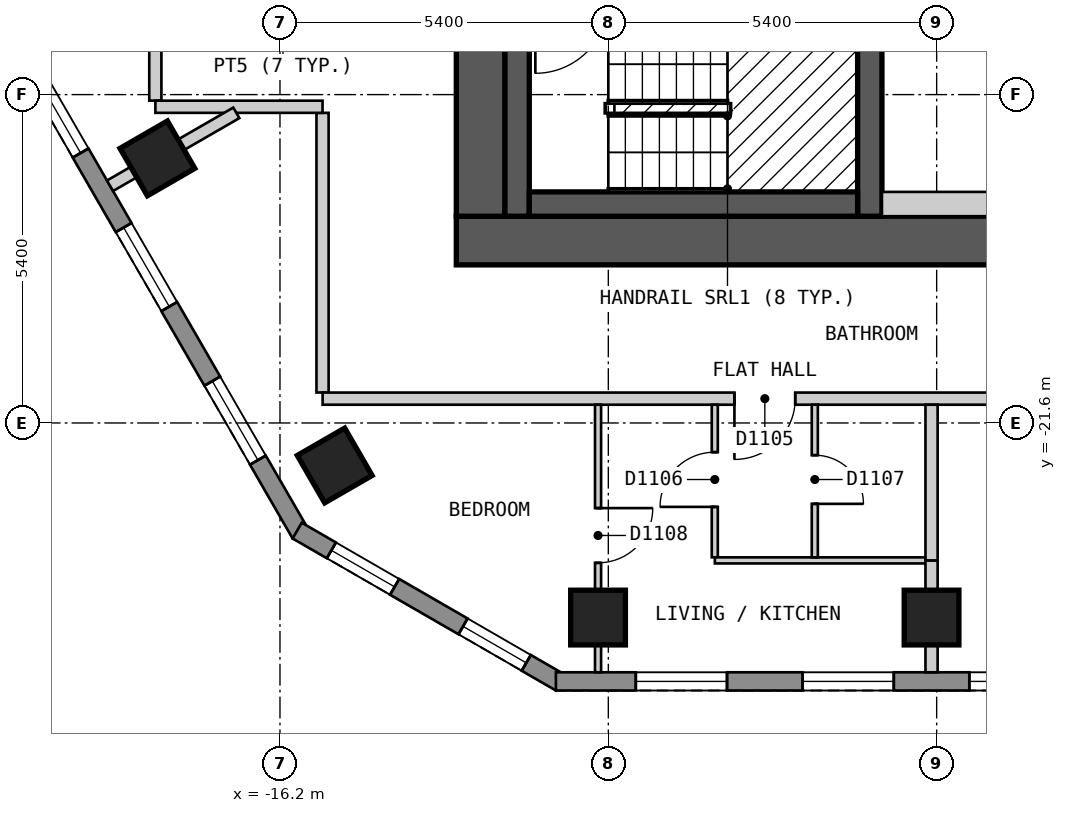
"""IFC4 building model, lengths in metres.
Left out: names, types, materials, properties, quantities, classifications, styles, units other than length and angle.
Written with IfcOpenShell. Run it as: python <this file> out.ifc"""

import sys

from ifc_helpers import new_model, si_unit, direction, frame, frame_2d, origin, origin_2d, place, context, subcontext, project, spatial, polyline, rectangle, outline, extrude, element, fill, save


model = new_model("IFC4")
c1 = context("Model", 3, precision=1e-05, world=origin(), true_north=direction((0.0, 1.0)))
c2 = subcontext(c1, "Body", "Model", "MODEL_VIEW")
j1 = project(units=[si_unit("LENGTHUNIT", "METRE"), si_unit("PLANEANGLEUNIT", "RADIAN")], contexts=[c1])
p1 = place(None, origin())
s1 = spatial("IfcSite", under=j1, at=p1, CompositionType="ELEMENT")
p2 = place(p1, origin())
s2 = spatial("IfcBuilding", under=s1, at=p2, CompositionType="ELEMENT")
p3 = place(p2, frame((0.0, 0.0, 150.6)))
s3 = spatial("IfcBuildingStorey", under=s2, at=p3, CompositionType="ELEMENT", Elevation=150.6)
for number, where, z_axis, x_axis in (
    (1, (-18.216, -17.249, 0.0), (0.0, 0.0, 1.0), (0.5, -0.866, 0.0)),
    (2, (-15.3, -22.299, 0.0), (0.0, 0.0, 1.0), (0.5, -0.866, 0.0)),
    (3, (-10.969, -24.8, 0.0), (0.0, 0.0, 1.0), (1.0, 0.0, 0.0)),
    (4, (-5.484, -24.8, 0.0), (0.0, 0.0, 1.0), (1.0, 0.0, 0.0)),
):
    element("IfcColumn", number, at=place(p3, frame(where, z_axis=z_axis, x_axis=x_axis)), inside=s3, PredefinedType="COLUMN", context=c2, shape_type="SweptSolid", body=[
        extrude(rectangle(XDim=0.9, YDim=0.9, at=origin_2d()), origin(), (0.0, 0.0, 1.0), 3.0),
    ])
p4 = place(p3, frame((-13.3, -18.6, 0.0), z_axis=(0.0, 0.0, 1.0), x_axis=(1.0, 0.0, 0.0)))
e5 = element("IfcWall", 5, at=p4, inside=s3, PredefinedType="SHEAR", context=c2, shape_type="SweptSolid", body=[
    extrude(rectangle(XDim=26.6, YDim=0.8, at=frame_2d((13.3, 0.0))), origin(), (0.0, 0.0, 1.0), 2.6),
])
p5 = place(p3, frame((-12.9, -18.2, 0.0), z_axis=(0.0, 0.0, 1.0), x_axis=(0.0, 1.0, 0.0)))
e6 = element("IfcWall", 6, at=p5, inside=s3, PredefinedType="SHEAR", context=c2, shape_type="SweptSolid", body=[
    extrude(rectangle(XDim=12.4, YDim=0.8, at=frame_2d((6.2, 0.0))), origin(), (0.0, 0.0, 1.0), 2.6),
])
p6 = place(p5, frame((4.0, 0.0, 0.0)))
e7 = element("IfcOpeningElement", 7, at=p6, cuts=e6, PredefinedType="OPENING", context=c2, shape_type="SweptSolid", body=[
    extrude(rectangle(XDim=1.2, YDim=2.1, at=frame_2d((0.6, 1.05))), frame((0.0, 0.41, 0.0), z_axis=(0.0, -1.0, 0.0), x_axis=(1.0, 0.0, 0.0)), (0.0, 0.0, 1.0), 0.82),
])
p7 = place(p3, frame((-6.5, -18.2, 0.0), z_axis=(0.0, 0.0, 1.0), x_axis=(0.0, 1.0, 0.0)))
e8 = element("IfcWall", 8, at=p7, inside=s3, PredefinedType="SHEAR", context=c2, shape_type="SweptSolid", body=[
    extrude(rectangle(XDim=3.35, YDim=0.4, at=frame_2d((1.675, 0.0))), origin(), (0.0, 0.0, 1.0), 2.6),
])
p8 = place(p3, frame((-28.218, -2.025, 0.0), z_axis=(0.0, 0.0, 1.0), x_axis=(0.500017503135, -0.866015298109, 0.0)))
e9 = element("IfcWall", 9, at=p8, inside=s3, PredefinedType="SOLIDWALL", context=c2, shape_type="SweptSolid", body=[
    extrude(outline(polyline([(0.0, -0.15), (24.711, -0.15), (24.631, 0.15), (0.08, 0.15), (0.0, -0.15)])), origin(), (0.0, 0.0, 1.0), 2.6),
])
p9 = place(p8, frame((1.4, 0.0, 0.15)))
e10 = element("IfcOpeningElement", 10, at=p9, cuts=e9, PredefinedType="OPENING", context=c2, shape_type="SweptSolid", body=[
    extrude(rectangle(XDim=1.5, YDim=2.1, at=frame_2d((0.75, 1.05))), frame((0.0, 0.16, 0.0), z_axis=(0.0, -1.0, 0.0), x_axis=(1.0, 0.0, 0.0)), (0.0, 0.0, 1.0), 0.32),
])
p10 = place(p8, frame((4.316, 0.0, 0.15)))
e11 = element("IfcOpeningElement", 11, at=p10, cuts=e9, PredefinedType="OPENING", context=c2, shape_type="SweptSolid", body=[
    extrude(rectangle(XDim=1.5, YDim=2.1, at=frame_2d((0.75, 1.05))), frame((0.0, 0.16, 0.0), z_axis=(0.0, -1.0, 0.0), x_axis=(1.0, 0.0, 0.0)), (0.0, 0.0, 1.0), 0.32),
])
p11 = place(p8, frame((7.231, 0.0, 0.15)))
e12 = element("IfcOpeningElement", 12, at=p11, cuts=e9, PredefinedType="OPENING", context=c2, shape_type="SweptSolid", body=[
    extrude(rectangle(XDim=1.5, YDim=2.1, at=frame_2d((0.75, 1.05))), frame((0.0, 0.16, 0.0), z_axis=(0.0, -1.0, 0.0), x_axis=(1.0, 0.0, 0.0)), (0.0, 0.0, 1.0), 0.32),
])
p12 = place(p8, frame((10.147, 0.0, 0.15)))
e13 = element("IfcOpeningElement", 13, at=p12, cuts=e9, PredefinedType="OPENING", context=c2, shape_type="SweptSolid", body=[
    extrude(rectangle(XDim=1.5, YDim=2.1, at=frame_2d((0.75, 1.05))), frame((0.0, 0.16, 0.0), z_axis=(0.0, -1.0, 0.0), x_axis=(1.0, 0.0, 0.0)), (0.0, 0.0, 1.0), 0.32),
])
p13 = place(p8, frame((13.062, 0.0, 0.15)))
e14 = element("IfcOpeningElement", 14, at=p13, cuts=e9, PredefinedType="OPENING", context=c2, shape_type="SweptSolid", body=[
    extrude(rectangle(XDim=1.5, YDim=2.1, at=frame_2d((0.75, 1.05))), frame((0.0, 0.16, 0.0), z_axis=(0.0, -1.0, 0.0), x_axis=(1.0, 0.0, 0.0)), (0.0, 0.0, 1.0), 0.32),
])
p14 = place(p8, frame((15.977, 0.0, 0.15)))
e15 = element("IfcOpeningElement", 15, at=p14, cuts=e9, PredefinedType="OPENING", context=c2, shape_type="SweptSolid", body=[
    extrude(rectangle(XDim=1.5, YDim=2.1, at=frame_2d((0.75, 1.05))), frame((0.0, 0.16, 0.0), z_axis=(0.0, -1.0, 0.0), x_axis=(1.0, 0.0, 0.0)), (0.0, 0.0, 1.0), 0.32),
])
p15 = place(p8, frame((18.893, 0.0, 0.15)))
e16 = element("IfcOpeningElement", 16, at=p15, cuts=e9, PredefinedType="OPENING", context=c2, shape_type="SweptSolid", body=[
    extrude(rectangle(XDim=1.5, YDim=2.1, at=frame_2d((0.75, 1.05))), frame((0.0, 0.16, 0.0), z_axis=(0.0, -1.0, 0.0), x_axis=(1.0, 0.0, 0.0)), (0.0, 0.0, 1.0), 0.32),
])
p16 = place(p8, frame((21.809, 0.0, 0.15)))
e17 = element("IfcOpeningElement", 17, at=p16, cuts=e9, PredefinedType="OPENING", context=c2, shape_type="SweptSolid", body=[
    extrude(rectangle(XDim=1.5, YDim=2.1, at=frame_2d((0.75, 1.05))), frame((0.0, 0.16, 0.0), z_axis=(0.0, -1.0, 0.0), x_axis=(1.0, 0.0, 0.0)), (0.0, 0.0, 1.0), 0.32),
])
p17 = place(p3, frame((-15.917, -23.37, 0.0), z_axis=(0.0, 0.0, 1.0), x_axis=(0.866022959057, -0.500004234368, 0.0)))
e18 = element("IfcWall", 18, at=p17, inside=s3, PredefinedType="SOLIDWALL", context=c2, shape_type="SweptSolid", body=[
    extrude(outline(polyline([(0.0, -0.15), (5.0, -0.15), (4.92, 0.15), (0.08, 0.15), (0.0, -0.15)])), origin(), (0.0, 0.0, 1.0), 2.6),
])
p18 = place(p17, frame((0.65, 0.0, 0.15)))
e19 = element("IfcOpeningElement", 19, at=p18, cuts=e18, PredefinedType="OPENING", context=c2, shape_type="SweptSolid", body=[
    extrude(rectangle(XDim=1.2, YDim=2.1, at=frame_2d((0.6, 1.05))), frame((0.0, 0.16, 0.0), z_axis=(0.0, -1.0, 0.0), x_axis=(1.0, 0.0, 0.0)), (0.0, 0.0, 1.0), 0.32),
])
p19 = place(p17, frame((3.15, 0.0, 0.15)))
e20 = element("IfcOpeningElement", 20, at=p19, cuts=e18, PredefinedType="OPENING", context=c2, shape_type="SweptSolid", body=[
    extrude(rectangle(XDim=1.2, YDim=2.1, at=frame_2d((0.6, 1.05))), frame((0.0, 0.16, 0.0), z_axis=(0.0, -1.0, 0.0), x_axis=(1.0, 0.0, 0.0)), (0.0, 0.0, 1.0), 0.32),
])
p20 = place(p3, frame((-11.662, -25.85, 0.0), z_axis=(0.0, 0.0, 1.0), x_axis=(1.0, 0.0, 0.0)))
e21 = element("IfcWall", 21, at=p20, inside=s3, PredefinedType="SOLIDWALL", context=c2, shape_type="SweptSolid", body=[
    extrude(outline(polyline([(0.0, -0.15), (23.324, -0.15), (23.244, 0.15), (0.08, 0.15), (0.0, -0.15)])), origin(), (0.0, 0.0, 1.0), 2.6),
])
p21 = place(p20, frame((1.314, 0.0, 0.15)))
e22 = element("IfcOpeningElement", 22, at=p21, cuts=e21, PredefinedType="OPENING", context=c2, shape_type="SweptSolid", body=[
    extrude(rectangle(XDim=1.5, YDim=2.1, at=frame_2d((0.75, 1.05))), frame((0.0, 0.16, 0.0), z_axis=(0.0, -1.0, 0.0), x_axis=(1.0, 0.0, 0.0)), (0.0, 0.0, 1.0), 0.32),
])
p22 = place(p20, frame((4.057, 0.0, 0.15)))
e23 = element("IfcOpeningElement", 23, at=p22, cuts=e21, PredefinedType="OPENING", context=c2, shape_type="SweptSolid", body=[
    extrude(rectangle(XDim=1.5, YDim=2.1, at=frame_2d((0.75, 1.05))), frame((0.0, 0.16, 0.0), z_axis=(0.0, -1.0, 0.0), x_axis=(1.0, 0.0, 0.0)), (0.0, 0.0, 1.0), 0.32),
])
p23 = place(p20, frame((6.799, 0.0, 0.15)))
e24 = element("IfcOpeningElement", 24, at=p23, cuts=e21, PredefinedType="OPENING", context=c2, shape_type="SweptSolid", body=[
    extrude(rectangle(XDim=1.5, YDim=2.1, at=frame_2d((0.75, 1.05))), frame((0.0, 0.16, 0.0), z_axis=(0.0, -1.0, 0.0), x_axis=(1.0, 0.0, 0.0)), (0.0, 0.0, 1.0), 0.32),
])
p24 = place(p20, frame((9.542, 0.0, 0.15)))
e25 = element("IfcOpeningElement", 25, at=p24, cuts=e21, PredefinedType="OPENING", context=c2, shape_type="SweptSolid", body=[
    extrude(rectangle(XDim=1.5, YDim=2.1, at=frame_2d((0.75, 1.05))), frame((0.0, 0.16, 0.0), z_axis=(0.0, -1.0, 0.0), x_axis=(1.0, 0.0, 0.0)), (0.0, 0.0, 1.0), 0.32),
])
p25 = place(p20, frame((12.284, 0.0, 0.15)))
e26 = element("IfcOpeningElement", 26, at=p25, cuts=e21, PredefinedType="OPENING", context=c2, shape_type="SweptSolid", body=[
    extrude(rectangle(XDim=1.5, YDim=2.1, at=frame_2d((0.75, 1.05))), frame((0.0, 0.16, 0.0), z_axis=(0.0, -1.0, 0.0), x_axis=(1.0, 0.0, 0.0)), (0.0, 0.0, 1.0), 0.32),
])
p26 = place(p20, frame((15.027, 0.0, 0.15)))
e27 = element("IfcOpeningElement", 27, at=p26, cuts=e21, PredefinedType="OPENING", context=c2, shape_type="SweptSolid", body=[
    extrude(rectangle(XDim=1.5, YDim=2.1, at=frame_2d((0.75, 1.05))), frame((0.0, 0.16, 0.0), z_axis=(0.0, -1.0, 0.0), x_axis=(1.0, 0.0, 0.0)), (0.0, 0.0, 1.0), 0.32),
])
p27 = place(p20, frame((17.769, 0.0, 0.15)))
e28 = element("IfcOpeningElement", 28, at=p27, cuts=e21, PredefinedType="OPENING", context=c2, shape_type="SweptSolid", body=[
    extrude(rectangle(XDim=1.5, YDim=2.1, at=frame_2d((0.75, 1.05))), frame((0.0, 0.16, 0.0), z_axis=(0.0, -1.0, 0.0), x_axis=(1.0, 0.0, 0.0)), (0.0, 0.0, 1.0), 0.32),
])
p28 = place(p20, frame((20.512, 0.0, 0.15)))
e29 = element("IfcOpeningElement", 29, at=p28, cuts=e21, PredefinedType="OPENING", context=c2, shape_type="SweptSolid", body=[
    extrude(rectangle(XDim=1.5, YDim=2.1, at=frame_2d((0.75, 1.05))), frame((0.0, 0.16, 0.0), z_axis=(0.0, -1.0, 0.0), x_axis=(1.0, 0.0, 0.0)), (0.0, 0.0, 1.0), 0.32),
])
p29 = place(p3, frame((-15.5, -16.5, 0.0), z_axis=(0.0, 0.0, 1.0), x_axis=(0.0, -1.0, 0.0)))
e30 = element("IfcWall", 30, at=p29, inside=s3, PredefinedType="PARTITIONING", context=c2, shape_type="SweptSolid", body=[
    extrude(rectangle(XDim=4.599, YDim=0.2, at=frame_2d((2.3, 0.0))), origin(), (0.0, 0.0, 1.0), 2.6),
])
p30 = place(p3, frame((-18.25, -10.593, 0.0), z_axis=(0.0, 0.0, 1.0), x_axis=(0.0, -1.0, 0.0)))
e31 = element("IfcWall", 31, at=p30, inside=s3, PredefinedType="PARTITIONING", context=c2, shape_type="SweptSolid", body=[
    extrude(rectangle(XDim=5.706, YDim=0.2, at=frame_2d((2.853, 0.0))), origin(), (0.0, 0.0, 1.0), 2.6),
])
p31 = place(p3, frame((-18.249, -16.4, 0.0), z_axis=(0.0, 0.0, 1.0), x_axis=(1.0, 0.0, 0.0)))
e32 = element("IfcWall", 32, at=p31, inside=s3, PredefinedType="PARTITIONING", context=c2, shape_type="SweptSolid", body=[
    extrude(rectangle(XDim=2.749, YDim=0.2, at=frame_2d((1.375, 0.0))), origin(), (0.0, 0.0, 1.0), 2.6),
])
p32 = place(p3, frame((-15.499, -21.2, 0.0), z_axis=(0.0, 0.0, 1.0), x_axis=(1.0, 0.0, 0.0)))
e33 = element("IfcWall", 33, at=p32, inside=s3, PredefinedType="PARTITIONING", context=c2, shape_type="SweptSolid", body=[
    extrude(rectangle(XDim=30.898, YDim=0.2, at=frame_2d((15.449, 0.0))), origin(), (0.0, 0.0, 1.0), 2.6),
])
p33 = place(p32, frame((6.773, 0.0, 0.0)))
e34 = element("IfcOpeningElement", 34, at=p33, cuts=e33, PredefinedType="OPENING", context=c2, shape_type="SweptSolid", body=[
    extrude(rectangle(XDim=1.0, YDim=2.1, at=frame_2d((0.5, 1.05))), frame((0.0, 0.11, 0.0), z_axis=(0.0, -1.0, 0.0), x_axis=(1.0, 0.0, 0.0)), (0.0, 0.0, 1.0), 0.22),
])
p34 = place(p32, frame((23.228, 0.0, 0.0)))
e35 = element("IfcOpeningElement", 35, at=p34, cuts=e33, PredefinedType="OPENING", context=c2, shape_type="SweptSolid", body=[
    extrude(rectangle(XDim=1.0, YDim=2.1, at=frame_2d((0.5, 1.05))), frame((0.0, 0.11, 0.0), z_axis=(0.0, -1.0, 0.0), x_axis=(1.0, 0.0, 0.0)), (0.0, 0.0, 1.0), 0.22),
])
p35 = place(p3, frame((-9.049, -21.3, 0.0), z_axis=(0.0, 0.0, 1.0), x_axis=(0.0, -1.0, 0.0)))
e36 = element("IfcWall", 36, at=p35, inside=s3, PredefinedType="PARTITIONING", context=c2, shape_type="SweptSolid", body=[
    extrude(rectangle(XDim=2.509, YDim=0.1, at=frame_2d((1.254, 0.0))), origin(), (0.0, 0.0, 1.0), 2.6),
])
p36 = place(p35, frame((0.78, 0.0, 0.0)))
e37 = element("IfcOpeningElement", 37, at=p36, cuts=e36, PredefinedType="OPENING", context=c2, shape_type="SweptSolid", body=[
    extrude(rectangle(XDim=0.9, YDim=2.1, at=frame_2d((0.45, 1.05))), frame((0.0, 0.06, 0.0), z_axis=(0.0, -1.0, 0.0), x_axis=(1.0, 0.0, 0.0)), (0.0, 0.0, 1.0), 0.12),
])
p37 = place(p3, frame((-9.048, -23.86, 0.0), z_axis=(0.0, 0.0, 1.0), x_axis=(1.0, 0.0, 0.0)))
e38 = element("IfcWall", 38, at=p37, inside=s3, PredefinedType="PARTITIONING", context=c2, shape_type="SweptSolid", body=[
    extrude(rectangle(XDim=3.464, YDim=0.1, at=frame_2d((1.732, 0.0))), origin(), (0.0, 0.0, 1.0), 2.6),
])
p38 = place(p3, frame((-7.404, -23.81, 0.0), z_axis=(0.0, 0.0, 1.0), x_axis=(0.0, 1.0, 0.0)))
e39 = element("IfcWall", 39, at=p38, inside=s3, PredefinedType="PARTITIONING", context=c2, shape_type="SweptSolid", body=[
    extrude(rectangle(XDim=2.51, YDim=0.1, at=frame_2d((1.255, 0.0))), origin(), (0.0, 0.0, 1.0), 2.6),
])
p39 = place(p38, frame((0.88, 0.0, 0.0)))
e40 = element("IfcOpeningElement", 40, at=p39, cuts=e39, PredefinedType="OPENING", context=c2, shape_type="SweptSolid", body=[
    extrude(rectangle(XDim=0.8, YDim=2.1, at=frame_2d((0.4, 1.05))), frame((0.0, 0.06, 0.0), z_axis=(0.0, -1.0, 0.0), x_axis=(1.0, 0.0, 0.0)), (0.0, 0.0, 1.0), 0.12),
])
p40 = place(p3, frame((-10.969, -25.7, 0.0), z_axis=(0.0, 0.0, 1.0), x_axis=(0.0, 1.0, 0.0)))
e41 = element("IfcWall", 41, at=p40, inside=s3, PredefinedType="PARTITIONING", context=c2, shape_type="SweptSolid", body=[
    extrude(rectangle(XDim=4.4, YDim=0.1, at=frame_2d((2.2, 0.0))), origin(), (0.0, 0.0, 1.0), 2.6),
])
p41 = place(p40, frame((1.8, 0.0, 0.0)))
e42 = element("IfcOpeningElement", 42, at=p41, cuts=e41, PredefinedType="OPENING", context=c2, shape_type="SweptSolid", body=[
    extrude(rectangle(XDim=0.9, YDim=2.1, at=frame_2d((0.45, 1.05))), frame((0.0, 0.06, 0.0), z_axis=(0.0, -1.0, 0.0), x_axis=(1.0, 0.0, 0.0)), (0.0, 0.0, 1.0), 0.12),
])
p42 = place(p3, frame((-5.484, -23.86, 0.0), z_axis=(0.0, 0.0, 1.0), x_axis=(0.0, -1.0, 0.0)))
e43 = element("IfcWall", 43, at=p42, inside=s3, PredefinedType="PARTITIONING", context=c2, shape_type="SweptSolid", body=[
    extrude(rectangle(XDim=1.84, YDim=0.2, at=frame_2d((0.92, 0.0))), origin(), (0.0, 0.0, 1.0), 2.6),
])
p43 = place(p3, frame((-5.484, -23.86, 0.0), z_axis=(0.0, 0.0, 1.0), x_axis=(0.0, 1.0, 0.0)))
e44 = element("IfcWall", 44, at=p43, inside=s3, PredefinedType="PARTITIONING", context=c2, shape_type="SweptSolid", body=[
    extrude(rectangle(XDim=2.56, YDim=0.2, at=frame_2d((1.28, 0.0))), origin(), (0.0, 0.0, 1.0), 2.6),
])
p44 = place(p3, frame((-18.995, -17.699, 0.0), z_axis=(0.0, 0.0, 1.0), x_axis=(0.86607371389, 0.499916315105, 0.0)))
e45 = element("IfcWall", 45, at=p44, inside=s3, PredefinedType="PARTITIONING", context=c2, shape_type="SweptSolid", body=[
    extrude(rectangle(XDim=2.398, YDim=0.2, at=frame_2d((1.199, 0.0))), origin(), (0.0, 0.0, 1.0), 2.6),
])
p45 = place(p3, frame((-12.3, -18.2, 0.0), z_axis=(0.0, 0.0, 1.0), x_axis=(0.0, 1.0, 0.0)))
e46 = element("IfcWall", 46, at=p45, inside=s3, PredefinedType="SOLIDWALL", context=c2, shape_type="SweptSolid", body=[
    extrude(rectangle(XDim=3.35, YDim=0.4, at=frame_2d((1.675, 0.0))), origin(), (0.0, 0.0, 1.0), 2.6),
])
p46 = place(p3, frame((-12.1, -18.0, 0.0), z_axis=(0.0, 0.0, 1.0), x_axis=(1.0, 0.0, 0.0)))
e47 = element("IfcWall", 47, at=p46, inside=s3, PredefinedType="SOLIDWALL", context=c2, shape_type="SweptSolid", body=[
    extrude(rectangle(XDim=5.4, YDim=0.4, at=frame_2d((2.7, 0.0))), origin(), (0.0, 0.0, 1.0), 2.6),
])
p47 = place(p3, frame((-6.3, -18.0, 0.0), z_axis=(0.0, 0.0, 1.0), x_axis=(1.0, 0.0, 0.0)))
e48 = element("IfcWall", 48, at=p47, inside=s3, PredefinedType="PARTITIONING", context=c2, shape_type="SweptSolid", body=[
    extrude(rectangle(XDim=12.6, YDim=0.4, at=frame_2d((6.3, 0.0))), origin(), (0.0, 0.0, 1.0), 2.6),
])
p48 = place(p14, origin())
e49 = element("IfcWindow", 49, at=p48, inside=s3, PartitioningType="SINGLE_PANEL", PredefinedType="WINDOW", context=c2, shape_type="SweptSolid", body=[
    extrude(rectangle(XDim=1.5, YDim=2.1, at=frame_2d((0.75, 1.05))), frame((0.0, 0.03, 0.0), z_axis=(0.0, -1.0, 0.0), x_axis=(1.0, 0.0, 0.0)), (0.0, 0.0, 1.0), 0.06),
])
fill(e15, e49)
p49 = place(p15, origin())
e50 = element("IfcWindow", 50, at=p49, inside=s3, PartitioningType="SINGLE_PANEL", PredefinedType="WINDOW", context=c2, shape_type="SweptSolid", body=[
    extrude(rectangle(XDim=1.5, YDim=2.1, at=frame_2d((0.75, 1.05))), frame((0.0, 0.03, 0.0), z_axis=(0.0, -1.0, 0.0), x_axis=(1.0, 0.0, 0.0)), (0.0, 0.0, 1.0), 0.06),
])
fill(e16, e50)
p50 = place(p16, origin())
e51 = element("IfcWindow", 51, at=p50, inside=s3, PartitioningType="SINGLE_PANEL", PredefinedType="WINDOW", context=c2, shape_type="SweptSolid", body=[
    extrude(rectangle(XDim=1.5, YDim=2.1, at=frame_2d((0.75, 1.05))), frame((0.0, 0.03, 0.0), z_axis=(0.0, -1.0, 0.0), x_axis=(1.0, 0.0, 0.0)), (0.0, 0.0, 1.0), 0.06),
])
fill(e17, e51)
p51 = place(p18, origin())
e52 = element("IfcWindow", 52, at=p51, inside=s3, PartitioningType="SINGLE_PANEL", PredefinedType="WINDOW", context=c2, shape_type="SweptSolid", body=[
    extrude(rectangle(XDim=1.2, YDim=2.1, at=frame_2d((0.6, 1.05))), frame((0.0, 0.03, 0.0), z_axis=(0.0, -1.0, 0.0), x_axis=(1.0, 0.0, 0.0)), (0.0, 0.0, 1.0), 0.06),
])
fill(e19, e52)
p52 = place(p19, origin())
e53 = element("IfcWindow", 53, at=p52, inside=s3, PartitioningType="SINGLE_PANEL", PredefinedType="WINDOW", context=c2, shape_type="SweptSolid", body=[
    extrude(rectangle(XDim=1.2, YDim=2.1, at=frame_2d((0.6, 1.05))), frame((0.0, 0.03, 0.0), z_axis=(0.0, -1.0, 0.0), x_axis=(1.0, 0.0, 0.0)), (0.0, 0.0, 1.0), 0.06),
])
fill(e20, e53)
p53 = place(p21, origin())
e54 = element("IfcWindow", 54, at=p53, inside=s3, PartitioningType="SINGLE_PANEL", PredefinedType="WINDOW", context=c2, shape_type="SweptSolid", body=[
    extrude(rectangle(XDim=1.5, YDim=2.1, at=frame_2d((0.75, 1.05))), frame((0.0, 0.03, 0.0), z_axis=(0.0, -1.0, 0.0), x_axis=(1.0, 0.0, 0.0)), (0.0, 0.0, 1.0), 0.06),
])
fill(e22, e54)
p54 = place(p22, origin())
e55 = element("IfcWindow", 55, at=p54, inside=s3, PartitioningType="SINGLE_PANEL", PredefinedType="WINDOW", context=c2, shape_type="SweptSolid", body=[
    extrude(rectangle(XDim=1.5, YDim=2.1, at=frame_2d((0.75, 1.05))), frame((0.0, 0.03, 0.0), z_axis=(0.0, -1.0, 0.0), x_axis=(1.0, 0.0, 0.0)), (0.0, 0.0, 1.0), 0.06),
])
fill(e23, e55)
p55 = place(p23, origin())
e56 = element("IfcWindow", 56, at=p55, inside=s3, PartitioningType="SINGLE_PANEL", PredefinedType="WINDOW", context=c2, shape_type="SweptSolid", body=[
    extrude(rectangle(XDim=1.5, YDim=2.1, at=frame_2d((0.75, 1.05))), frame((0.0, 0.03, 0.0), z_axis=(0.0, -1.0, 0.0), x_axis=(1.0, 0.0, 0.0)), (0.0, 0.0, 1.0), 0.06),
])
fill(e24, e56)
p56 = place(p33, origin())
e57 = element("IfcDoor", 57, at=p56, inside=s3, OperationType="SINGLE_SWING_LEFT", PredefinedType="DOOR", context=c2, shape_type="SweptSolid", body=[
    extrude(rectangle(XDim=1.0, YDim=2.1, at=frame_2d((0.5, 1.05))), frame((0.0, 0.025, 0.0), z_axis=(0.0, -1.0, 0.0), x_axis=(1.0, 0.0, 0.0)), (0.0, 0.0, 1.0), 0.05),
])
fill(e34, e57)
p57 = place(p36, origin())
e58 = element("IfcDoor", 58, at=p57, inside=s3, OperationType="SINGLE_SWING_RIGHT", PredefinedType="DOOR", context=c2, shape_type="SweptSolid", body=[
    extrude(rectangle(XDim=0.9, YDim=2.1, at=frame_2d((0.45, 1.05))), frame((0.0, 0.025, 0.0), z_axis=(0.0, -1.0, 0.0), x_axis=(1.0, 0.0, 0.0)), (0.0, 0.0, 1.0), 0.05),
])
fill(e37, e58)
p58 = place(p39, origin())
e59 = element("IfcDoor", 59, at=p58, inside=s3, OperationType="SINGLE_SWING_LEFT", PredefinedType="DOOR", context=c2, shape_type="SweptSolid", body=[
    extrude(rectangle(XDim=0.8, YDim=2.1, at=frame_2d((0.4, 1.05))), frame((0.0, 0.025, 0.0), z_axis=(0.0, -1.0, 0.0), x_axis=(1.0, 0.0, 0.0)), (0.0, 0.0, 1.0), 0.05),
])
fill(e40, e59)
p59 = place(p41, origin())
e60 = element("IfcDoor", 60, at=p59, inside=s3, OperationType="SINGLE_SWING_RIGHT", PredefinedType="DOOR", context=c2, shape_type="SweptSolid", body=[
    extrude(rectangle(XDim=0.9, YDim=2.1, at=frame_2d((0.45, 1.05))), frame((0.0, 0.025, 0.0), z_axis=(0.0, -1.0, 0.0), x_axis=(1.0, 0.0, 0.0)), (0.0, 0.0, 1.0), 0.05),
])
fill(e42, e60)
save(model, sys.argv[1])
